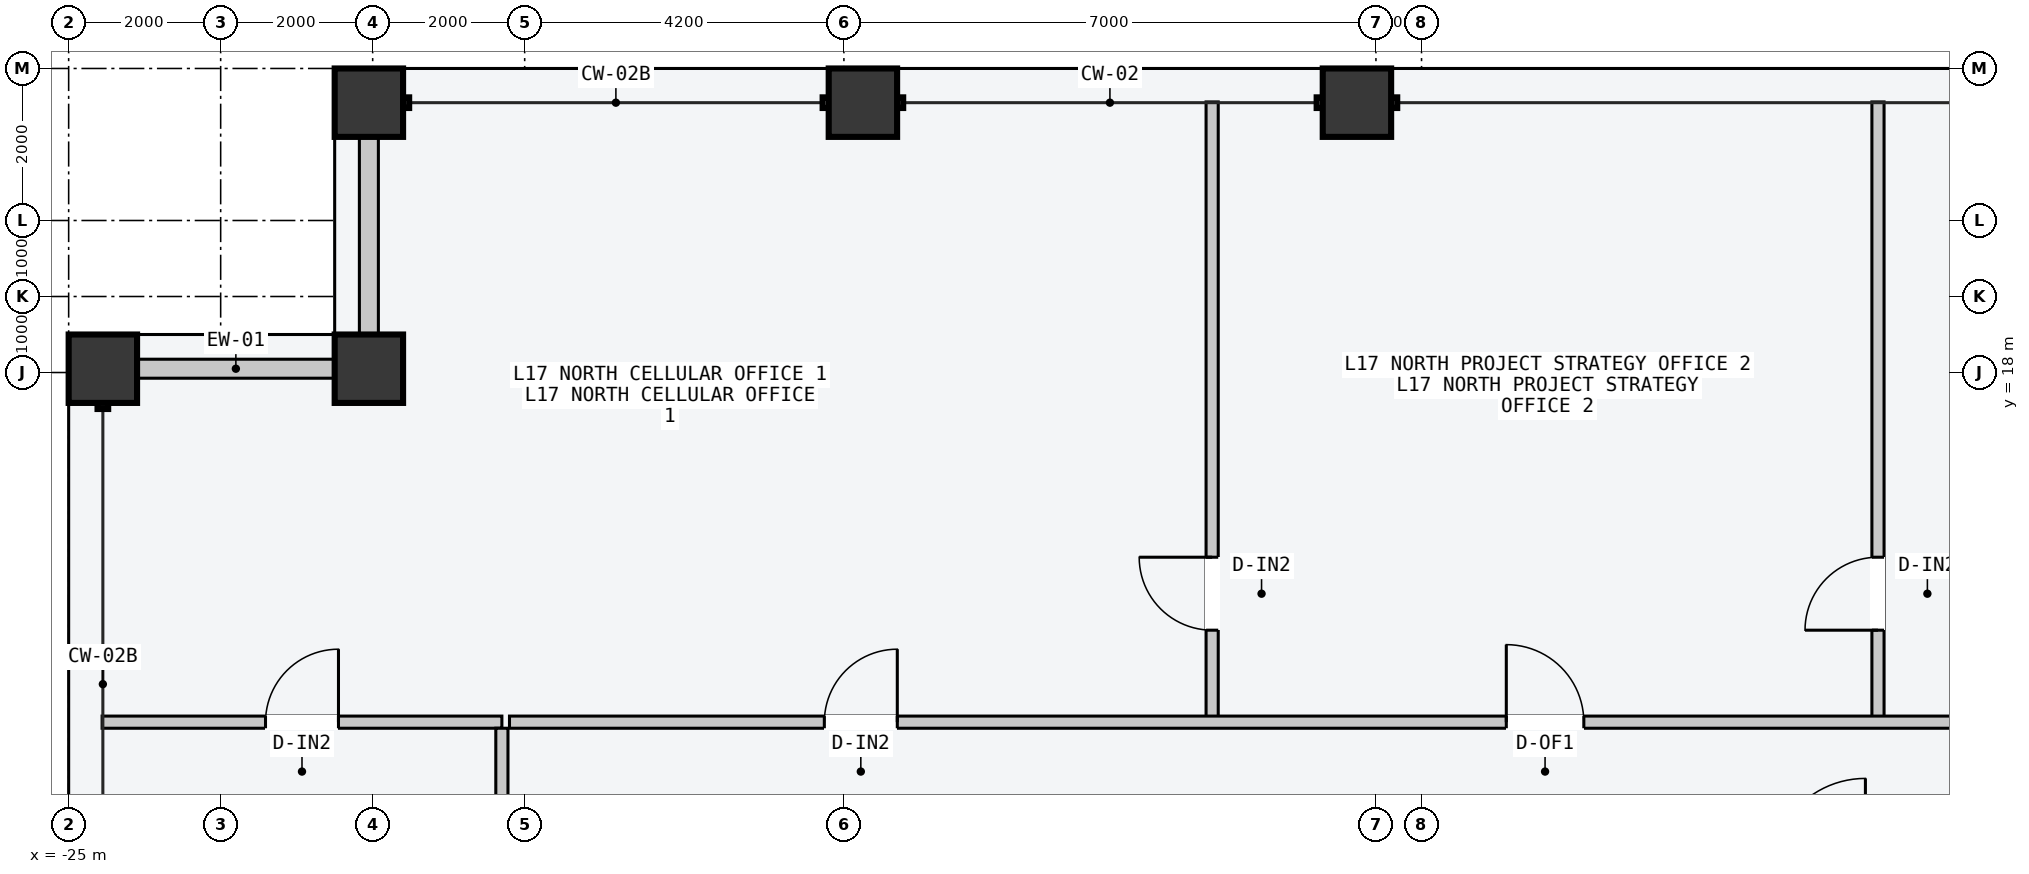
"""IFC4 building model, lengths in metres.
Left out: names, types, materials, properties, quantities, classifications, styles, units other than length and angle.
Written with IfcOpenShell. Run it as: python <this file> out.ifc"""

import sys

from ifc_helpers import new_model, si_unit, direction, frame, frame_2d, origin, origin_2d, place, context, subcontext, project, spatial, rectangle, hollow_rectangle, extrude, element, fill, save


model = new_model("IFC4")
c1 = context("Model", 3, precision=1e-05, world=origin(), true_north=direction((0.0, 1.0)))
c2 = subcontext(c1, "Body", "Model", "MODEL_VIEW")
j1 = project(units=[si_unit("LENGTHUNIT", "METRE"), si_unit("PLANEANGLEUNIT", "RADIAN")], contexts=[c1])
p1 = place(None, origin())
s1 = spatial("IfcSite", under=j1, at=p1, CompositionType="ELEMENT")
p2 = place(p1, origin())
s2 = spatial("IfcBuilding", under=s1, at=p2, CompositionType="ELEMENT")
p3 = place(p2, frame((0.0, 0.0, 67.2)))
s3 = spatial("IfcBuildingStorey", under=s2, at=p3, CompositionType="ELEMENT", Elevation=67.2)
for number, where, z_axis, x_axis in (
    (1, (-21.05, 21.55, 0.0), (0.0, 0.0, 1.0), (1.0, 0.0, 0.0)),
    (2, (-14.55, 21.55, 0.0), (0.0, 0.0, 1.0), (1.0, 0.0, 0.0)),
    (3, (-8.05, 21.55, 0.0), (0.0, 0.0, 1.0), (1.0, 0.0, 0.0)),
    (4, (-24.55, 18.05, 0.0), (0.0, 0.0, 1.0), (0.0, 1.0, 0.0)),
    (5, (-21.05, 18.05, 0.0), (0.0, 0.0, 1.0), (1.0, 0.0, 0.0)),
):
    element("IfcColumn", number, at=place(p3, frame(where, z_axis=z_axis, x_axis=x_axis)), inside=s3, PredefinedType="COLUMN", context=c2, shape_type="SweptSolid", body=[
        extrude(hollow_rectangle(XDim=0.9, YDim=0.9, WallThickness=0.045, at=origin_2d()), origin(), (0.0, 0.0, 1.0), 3.6),
    ])
for number, where, z_axis, x_axis in (
    (6, (-24.09, 18.05, 0.0), (0.0, 0.0, 1.0), (1.0, 0.0, 0.0)),
    (7, (-21.05, 18.51, 0.0), (0.0, 0.0, 1.0), (0.0, 1.0, 0.0)),
):
    element("IfcWall", number, at=place(p3, frame(where, z_axis=z_axis, x_axis=x_axis)), inside=s3, PredefinedType="STANDARD", context=c2, shape_type="SweptSolid", body=[
        extrude(rectangle(XDim=2.58, YDim=0.25, at=frame_2d((1.29, 0.0))), origin(), (0.0, 0.0, 1.0), 2.7),
    ])
p4 = place(p3, frame((-9.955, 13.46, 0.0), z_axis=(0.0, 0.0, 1.0), x_axis=(0.0, 1.0, 0.0)))
e8 = element("IfcWall", 8, at=p4, inside=s3, PredefinedType="PARTITIONING", context=c2, shape_type="SweptSolid", body=[
    extrude(rectangle(XDim=8.1, YDim=0.16, at=frame_2d((4.05, 0.0))), origin(), (0.0, 0.0, 1.0), 3.4),
])
p5 = place(p4, frame((1.15, 0.0, 0.0)))
e9 = element("IfcOpeningElement", 9, at=p5, cuts=e8, PredefinedType="OPENING", context=c2, shape_type="SweptSolid", body=[
    extrude(rectangle(XDim=0.96, YDim=2.18, at=frame_2d((0.48, 1.09))), frame((0.0, 0.09, 0.0), z_axis=(0.0, -1.0, 0.0), x_axis=(1.0, 0.0, 0.0)), (0.0, 0.0, 1.0), 0.18),
])
p6 = place(p3, frame((-1.195, 13.46, 0.0), z_axis=(0.0, 0.0, 1.0), x_axis=(0.0, 1.0, 0.0)))
e10 = element("IfcWall", 10, at=p6, inside=s3, PredefinedType="PARTITIONING", context=c2, shape_type="SweptSolid", body=[
    extrude(rectangle(XDim=8.1, YDim=0.16, at=frame_2d((4.05, 0.0))), origin(), (0.0, 0.0, 1.0), 3.4),
])
p7 = place(p6, frame((1.15, 0.0, 0.0)))
e11 = element("IfcOpeningElement", 11, at=p7, cuts=e10, PredefinedType="OPENING", context=c2, shape_type="SweptSolid", body=[
    extrude(rectangle(XDim=0.96, YDim=2.18, at=frame_2d((0.48, 1.09))), frame((0.0, 0.09, 0.0), z_axis=(0.0, -1.0, 0.0), x_axis=(1.0, 0.0, 0.0)), (0.0, 0.0, 1.0), 0.18),
])
p8 = place(p3, frame((-19.2, 13.4, 0.0), z_axis=(0.0, 0.0, 1.0), x_axis=(1.0, 0.0, 0.0)))
e12 = element("IfcWall", 12, at=p8, inside=s3, PredefinedType="PARTITIONING", context=c2, shape_type="SweptSolid", body=[
    extrude(rectangle(XDim=38.4, YDim=0.16, at=frame_2d((19.2, 0.0))), origin(), (0.0, 0.0, 1.0), 3.4),
])
p9 = place(p8, frame((4.143, 0.0, 0.0)))
e13 = element("IfcOpeningElement", 13, at=p9, cuts=e12, PredefinedType="OPENING", context=c2, shape_type="SweptSolid", body=[
    extrude(rectangle(XDim=0.96, YDim=2.18, at=frame_2d((0.48, 1.09))), frame((0.0, 0.09, 0.0), z_axis=(0.0, -1.0, 0.0), x_axis=(1.0, 0.0, 0.0)), (0.0, 0.0, 1.0), 0.18),
])
p10 = place(p8, frame((13.115, 0.0, 0.0)))
e14 = element("IfcOpeningElement", 14, at=p10, cuts=e12, PredefinedType="OPENING", context=c2, shape_type="SweptSolid", body=[
    extrude(rectangle(XDim=1.02, YDim=2.2, at=frame_2d((0.51, 1.1))), frame((0.0, 0.09, 0.0), z_axis=(0.0, -1.0, 0.0), x_axis=(1.0, 0.0, 0.0)), (0.0, 0.0, 1.0), 0.18),
])
p11 = place(p8, frame((21.258, 0.0, 0.0)))
e15 = element("IfcOpeningElement", 15, at=p11, cuts=e12, PredefinedType="OPENING", context=c2, shape_type="SweptSolid", body=[
    extrude(rectangle(XDim=1.06, YDim=2.2, at=frame_2d((0.53, 1.1))), frame((0.0, 0.09, 0.0), z_axis=(0.0, -1.0, 0.0), x_axis=(1.0, 0.0, 0.0)), (0.0, 0.0, 1.0), 0.18),
])
p12 = place(p8, frame((28.535, 0.0, 0.0)))
e16 = element("IfcOpeningElement", 16, at=p12, cuts=e12, PredefinedType="OPENING", context=c2, shape_type="SweptSolid", body=[
    extrude(rectangle(XDim=1.24, YDim=2.24, at=frame_2d((0.62, 1.12))), frame((0.0, 0.09, 0.0), z_axis=(0.0, -1.0, 0.0), x_axis=(1.0, 0.0, 0.0)), (0.0, 0.0, 1.0), 0.18),
])
p13 = place(p8, frame((34.869, 0.0, 0.0)))
e17 = element("IfcOpeningElement", 17, at=p13, cuts=e12, PredefinedType="OPENING", context=c2, shape_type="SweptSolid", body=[
    extrude(rectangle(XDim=1.4, YDim=2.2, at=frame_2d((0.7, 1.1))), frame((0.0, 0.09, 0.0), z_axis=(0.0, -1.0, 0.0), x_axis=(1.0, 0.0, 0.0)), (0.0, 0.0, 1.0), 0.18),
])
p14 = place(p3, frame((-24.56, 13.4, 0.0), z_axis=(0.0, 0.0, 1.0), x_axis=(1.0, 0.0, 0.0)))
e18 = element("IfcWall", 18, at=p14, inside=s3, PredefinedType="PARTITIONING", context=c2, shape_type="SweptSolid", body=[
    extrude(rectangle(XDim=5.26, YDim=0.16, at=frame_2d((2.63, 0.0))), origin(), (0.0, 0.0, 1.0), 3.4),
])
p15 = place(p14, frame((2.15, 0.0, 0.0)))
e19 = element("IfcOpeningElement", 19, at=p15, cuts=e18, PredefinedType="OPENING", context=c2, shape_type="SweptSolid", body=[
    extrude(rectangle(XDim=0.96, YDim=2.18, at=frame_2d((0.48, 1.09))), frame((0.0, 0.09, 0.0), z_axis=(0.0, -1.0, 0.0), x_axis=(1.0, 0.0, 0.0)), (0.0, 0.0, 1.0), 0.18),
])
p16 = place(p3, frame((-19.3, -12.12, 0.0), z_axis=(0.0, 0.0, 1.0), x_axis=(0.0, 1.0, 0.0)))
e20 = element("IfcWall", 20, at=p16, inside=s3, PredefinedType="PARTITIONING", context=c2, shape_type="SweptSolid", body=[
    extrude(rectangle(XDim=25.44, YDim=0.16, at=frame_2d((12.72, 0.0))), origin(), (0.0, 0.0, 1.0), 3.4),
])
p17 = place(p16, frame((12.21, 0.0, 0.0)))
e21 = element("IfcOpeningElement", 21, at=p17, cuts=e20, PredefinedType="OPENING", context=c2, shape_type="SweptSolid", body=[
    extrude(rectangle(XDim=1.02, YDim=2.2, at=frame_2d((0.51, 1.1))), frame((0.0, 0.09, 0.0), z_axis=(0.0, -1.0, 0.0), x_axis=(1.0, 0.0, 0.0)), (0.0, 0.0, 1.0), 0.18),
])
p18 = place(p5, origin())
e22 = element("IfcDoor", 22, at=p18, inside=s3, OperationType="SINGLE_SWING_RIGHT", PredefinedType="DOOR", context=c2, shape_type="SweptSolid", body=[
    extrude(rectangle(XDim=0.96, YDim=2.18, at=frame_2d((0.48, 1.09))), frame((0.0, 0.025, 0.0), z_axis=(0.0, -1.0, 0.0), x_axis=(1.0, 0.0, 0.0)), (0.0, 0.0, 1.0), 0.05),
])
fill(e9, e22)
p19 = place(p7, origin())
e23 = element("IfcDoor", 23, at=p19, inside=s3, OperationType="SINGLE_SWING_LEFT", PredefinedType="DOOR", context=c2, shape_type="SweptSolid", body=[
    extrude(rectangle(XDim=0.96, YDim=2.18, at=frame_2d((0.48, 1.09))), frame((0.0, 0.025, 0.0), z_axis=(0.0, -1.0, 0.0), x_axis=(1.0, 0.0, 0.0)), (0.0, 0.0, 1.0), 0.05),
])
fill(e11, e23)
p20 = place(p9, origin())
e24 = element("IfcDoor", 24, at=p20, inside=s3, OperationType="SINGLE_SWING_RIGHT", PredefinedType="DOOR", context=c2, shape_type="SweptSolid", body=[
    extrude(rectangle(XDim=0.96, YDim=2.18, at=frame_2d((0.48, 1.09))), frame((0.0, 0.025, 0.0), z_axis=(0.0, -1.0, 0.0), x_axis=(1.0, 0.0, 0.0)), (0.0, 0.0, 1.0), 0.05),
])
fill(e13, e24)
p21 = place(p10, origin())
e25 = element("IfcDoor", 25, at=p21, inside=s3, OperationType="SINGLE_SWING_LEFT", PredefinedType="DOOR", context=c2, shape_type="SweptSolid", body=[
    extrude(rectangle(XDim=1.02, YDim=2.2, at=frame_2d((0.51, 1.1))), frame((0.0, 0.025, 0.0), z_axis=(0.0, -1.0, 0.0), x_axis=(1.0, 0.0, 0.0)), (0.0, 0.0, 1.0), 0.05),
])
fill(e14, e25)
p22 = place(p15, origin())
e26 = element("IfcDoor", 26, at=p22, inside=s3, OperationType="SINGLE_SWING_RIGHT", PredefinedType="DOOR", context=c2, shape_type="SweptSolid", body=[
    extrude(rectangle(XDim=0.96, YDim=2.18, at=frame_2d((0.48, 1.09))), frame((0.0, 0.025, 0.0), z_axis=(0.0, -1.0, 0.0), x_axis=(1.0, 0.0, 0.0)), (0.0, 0.0, 1.0), 0.05),
])
fill(e19, e26)
save(model, sys.argv[1])
